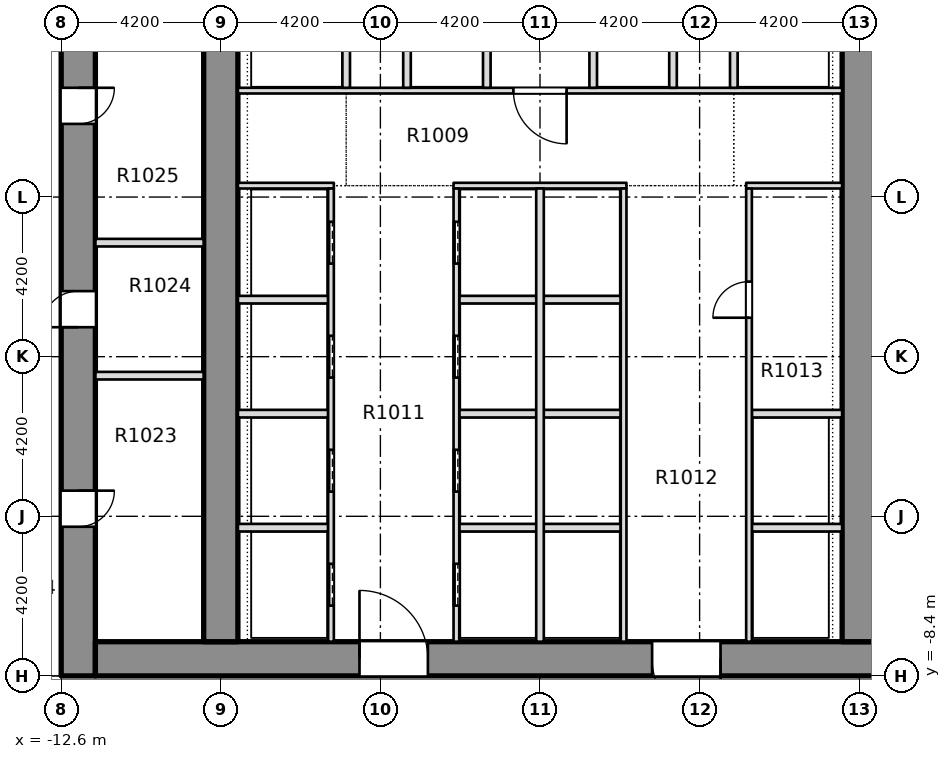
"""IFC4 building model, lengths in metres.
Left out: names, types, materials, properties, quantities, classifications, styles, units other than length and angle.
Written with IfcOpenShell. Run it as: python <this file> out.ifc"""

import sys

from ifc_helpers import new_model, si_unit, direction, frame, frame_2d, origin, place, context, subcontext, project, spatial, rectangle, extrude, element, fill, save


model = new_model("IFC4")
c1 = context("Model", 3, precision=1e-05, world=origin(), true_north=direction((0.0, 1.0)))
c2 = subcontext(c1, "Body", "Model", "MODEL_VIEW")
j1 = project(units=[si_unit("LENGTHUNIT", "METRE"), si_unit("PLANEANGLEUNIT", "RADIAN")], contexts=[c1])
p1 = place(None, origin())
s1 = spatial("IfcSite", under=j1, at=p1, CompositionType="ELEMENT")
p2 = place(p1, origin())
s2 = spatial("IfcBuilding", under=s1, at=p2, CompositionType="ELEMENT")
p3 = place(p2, frame((0.0, 0.0, 48.3)))
s3 = spatial("IfcBuildingStorey", under=s2, at=p3, CompositionType="ELEMENT", Elevation=48.3)
p4 = place(p3, frame((-12.15, -8.4, -0.32), z_axis=(0.0, 0.0, 1.0), x_axis=(0.0, 1.0, 0.0)))
e1 = element("IfcWall", 1, at=p4, inside=s3, PredefinedType="SHEAR", context=c2, shape_type="SweptSolid", body=[
    extrude(rectangle(XDim=30.15, YDim=0.9, at=frame_2d((15.075, 0.0))), origin(), (0.0, 0.0, 1.0), 3.45),
])
p5 = place(p4, frame((3.925, 0.0, 0.32)))
e2 = element("IfcOpeningElement", 2, at=p5, cuts=e1, PredefinedType="OPENING", context=c2, shape_type="SweptSolid", body=[
    extrude(rectangle(XDim=0.95, YDim=2.1, at=frame_2d((0.475, 1.05))), frame((0.0, 0.46, 0.0), z_axis=(0.0, -1.0, 0.0), x_axis=(1.0, 0.0, 0.0)), (0.0, 0.0, 1.0), 0.92),
])
p6 = place(p4, frame((9.175, 0.0, 0.32)))
e3 = element("IfcOpeningElement", 3, at=p6, cuts=e1, PredefinedType="OPENING", context=c2, shape_type="SweptSolid", body=[
    extrude(rectangle(XDim=0.95, YDim=2.1, at=frame_2d((0.475, 1.05))), frame((0.0, 0.46, 0.0), z_axis=(0.0, -1.0, 0.0), x_axis=(1.0, 0.0, 0.0)), (0.0, 0.0, 1.0), 0.92),
])
p7 = place(p4, frame((14.525, 0.0, 0.32)))
e4 = element("IfcOpeningElement", 4, at=p7, cuts=e1, PredefinedType="OPENING", context=c2, shape_type="SweptSolid", body=[
    extrude(rectangle(XDim=0.95, YDim=2.1, at=frame_2d((0.475, 1.05))), frame((0.0, 0.46, 0.0), z_axis=(0.0, -1.0, 0.0), x_axis=(1.0, 0.0, 0.0)), (0.0, 0.0, 1.0), 0.92),
])
p8 = place(p4, frame((22.225, 0.0, 0.32)))
e5 = element("IfcOpeningElement", 5, at=p8, cuts=e1, PredefinedType="OPENING", context=c2, shape_type="SweptSolid", body=[
    extrude(rectangle(XDim=0.95, YDim=2.1, at=frame_2d((0.475, 1.05))), frame((0.0, 0.46, 0.0), z_axis=(0.0, -1.0, 0.0), x_axis=(1.0, 0.0, 0.0)), (0.0, 0.0, 1.0), 0.92),
])
p9 = place(p4, frame((26.25, 0.0, 0.32)))
e6 = element("IfcOpeningElement", 6, at=p9, cuts=e1, PredefinedType="OPENING", context=c2, shape_type="SweptSolid", body=[
    extrude(rectangle(XDim=0.95, YDim=2.1, at=frame_2d((0.475, 1.05))), frame((0.0, 0.46, 0.0), z_axis=(0.0, -1.0, 0.0), x_axis=(1.0, 0.0, 0.0)), (0.0, 0.0, 1.0), 0.92),
])
p10 = place(p4, frame((19.3, 0.0, 0.32)))
e7 = element("IfcOpeningElement", 7, at=p10, cuts=e1, PredefinedType="OPENING", context=c2, shape_type="SweptSolid", body=[
    extrude(rectangle(XDim=1.2, YDim=2.1, at=frame_2d((0.6, 1.05))), frame((0.0, 0.46, 0.0), z_axis=(0.0, -1.0, 0.0), x_axis=(1.0, 0.0, 0.0)), (0.0, 0.0, 1.0), 0.92),
])
p11 = place(p3, frame((-11.7, -7.95, -0.32), z_axis=(0.0, 0.0, 1.0), x_axis=(1.0, 0.0, 0.0)))
e8 = element("IfcWall", 8, at=p11, inside=s3, PredefinedType="SHEAR", context=c2, shape_type="SweptSolid", body=[
    extrude(rectangle(XDim=23.4, YDim=0.9, at=frame_2d((11.7, 0.0))), origin(), (0.0, 0.0, 1.0), 3.45),
])
p12 = place(p11, frame((6.95, 0.0, 0.32)))
e9 = element("IfcOpeningElement", 9, at=p12, cuts=e8, PredefinedType="OPENING", context=c2, shape_type="SweptSolid", body=[
    extrude(rectangle(XDim=1.8, YDim=2.1, at=frame_2d((0.9, 1.05))), frame((0.0, 0.46, 0.0), z_axis=(0.0, -1.0, 0.0), x_axis=(1.0, 0.0, 0.0)), (0.0, 0.0, 1.0), 0.92),
])
p13 = place(p11, frame((14.65, 0.0, 0.32)))
e10 = element("IfcOpeningElement", 10, at=p13, cuts=e8, PredefinedType="OPENING", context=c2, shape_type="SweptSolid", body=[
    extrude(rectangle(XDim=1.8, YDim=2.1, at=frame_2d((0.9, 1.05))), frame((0.0, 0.46, 0.0), z_axis=(0.0, -1.0, 0.0), x_axis=(1.0, 0.0, 0.0)), (0.0, 0.0, 1.0), 0.92),
])
p14 = place(p3, frame((-8.4, -7.5, -0.32), z_axis=(0.0, 0.0, 1.0), x_axis=(0.0, 1.0, 0.0)))
e11 = element("IfcWall", 11, at=p14, inside=s3, PredefinedType="SHEAR", context=c2, shape_type="SweptSolid", body=[
    extrude(rectangle(XDim=28.35, YDim=0.9, at=frame_2d((14.175, 0.0))), origin(), (0.0, 0.0, 1.0), 3.45),
])
p15 = place(p14, frame((18.4, 0.0, 0.32)))
e12 = element("IfcOpeningElement", 12, at=p15, cuts=e11, PredefinedType="OPENING", context=c2, shape_type="SweptSolid", body=[
    extrude(rectangle(XDim=1.2, YDim=2.1, at=frame_2d((0.6, 1.05))), frame((0.0, 0.46, 0.0), z_axis=(0.0, -1.0, 0.0), x_axis=(1.0, 0.0, 0.0)), (0.0, 0.0, 1.0), 0.92),
])
p16 = place(p3, frame((8.4, -7.5, -0.32), z_axis=(0.0, 0.0, 1.0), x_axis=(0.0, 1.0, 0.0)))
e13 = element("IfcWall", 13, at=p16, inside=s3, PredefinedType="SHEAR", context=c2, shape_type="SweptSolid", body=[
    extrude(rectangle(XDim=28.35, YDim=0.9, at=frame_2d((14.175, 0.0))), origin(), (0.0, 0.0, 1.0), 3.45),
])
p17 = place(p16, frame((18.4, 0.0, 0.32)))
e14 = element("IfcOpeningElement", 14, at=p17, cuts=e13, PredefinedType="OPENING", context=c2, shape_type="SweptSolid", body=[
    extrude(rectangle(XDim=1.2, YDim=2.1, at=frame_2d((0.6, 1.05))), frame((0.0, 0.46, 0.0), z_axis=(0.0, -1.0, 0.0), x_axis=(1.0, 0.0, 0.0)), (0.0, 0.0, 1.0), 0.92),
])
p18 = place(p3, frame((-7.949, -4.5, 0.0), z_axis=(0.0, 0.0, 1.0), x_axis=(1.0, 0.0, 0.0)))
e15 = element("IfcWall", 15, at=p18, inside=s3, PredefinedType="PARTITIONING", context=c2, shape_type="SweptSolid", body=[
    extrude(rectangle(XDim=2.374, YDim=0.2, at=frame_2d((1.187, 0.0))), origin(), (0.0, 0.0, 1.0), 3.13),
])
p19 = place(p3, frame((-2.125, -4.5, 0.0), z_axis=(0.0, 0.0, 1.0), x_axis=(1.0, 0.0, 0.0)))
e16 = element("IfcWall", 16, at=p19, inside=s3, PredefinedType="PARTITIONING", context=c2, shape_type="SweptSolid", body=[
    extrude(rectangle(XDim=4.25, YDim=0.2, at=frame_2d((2.125, 0.0))), origin(), (0.0, 0.0, 1.0), 3.13),
])
for number, where, z_axis, x_axis in (
    (17, (5.575, -4.5, 0.0), (0.0, 0.0, 1.0), (1.0, 0.0, 0.0)),
    (18, (-7.949, -1.5, 0.0), (0.0, 0.0, 1.0), (1.0, 0.0, 0.0)),
):
    element("IfcWall", number, at=place(p3, frame(where, z_axis=z_axis, x_axis=x_axis)), inside=s3, PredefinedType="PARTITIONING", context=c2, shape_type="SweptSolid", body=[
        extrude(rectangle(XDim=2.374, YDim=0.2, at=frame_2d((1.187, 0.0))), origin(), (0.0, 0.0, 1.0), 3.13),
    ])
p20 = place(p3, frame((-2.125, -1.5, 0.0), z_axis=(0.0, 0.0, 1.0), x_axis=(1.0, 0.0, 0.0)))
e19 = element("IfcWall", 19, at=p20, inside=s3, PredefinedType="PARTITIONING", context=c2, shape_type="SweptSolid", body=[
    extrude(rectangle(XDim=4.25, YDim=0.2, at=frame_2d((2.125, 0.0))), origin(), (0.0, 0.0, 1.0), 3.13),
])
for number, where, z_axis, x_axis in (
    (20, (5.575, -1.5, 0.0), (0.0, 0.0, 1.0), (1.0, 0.0, 0.0)),
    (21, (-7.949, 1.5, 0.0), (0.0, 0.0, 1.0), (1.0, 0.0, 0.0)),
):
    element("IfcWall", number, at=place(p3, frame(where, z_axis=z_axis, x_axis=x_axis)), inside=s3, PredefinedType="PARTITIONING", context=c2, shape_type="SweptSolid", body=[
        extrude(rectangle(XDim=2.374, YDim=0.2, at=frame_2d((1.187, 0.0))), origin(), (0.0, 0.0, 1.0), 3.13),
    ])
p21 = place(p3, frame((-2.125, 1.5, 0.0), z_axis=(0.0, 0.0, 1.0), x_axis=(1.0, 0.0, 0.0)))
e22 = element("IfcWall", 22, at=p21, inside=s3, PredefinedType="PARTITIONING", context=c2, shape_type="SweptSolid", body=[
    extrude(rectangle(XDim=4.25, YDim=0.2, at=frame_2d((2.125, 0.0))), origin(), (0.0, 0.0, 1.0), 3.13),
])
p22 = place(p3, frame((-7.949, 4.5, 0.0), z_axis=(0.0, 0.0, 1.0), x_axis=(1.0, 0.0, 0.0)))
e23 = element("IfcWall", 23, at=p22, inside=s3, PredefinedType="PARTITIONING", context=c2, shape_type="SweptSolid", body=[
    extrude(rectangle(XDim=2.524, YDim=0.15, at=frame_2d((1.262, 0.0))), origin(), (0.0, 0.0, 1.0), 3.13),
])
p23 = place(p3, frame((-2.275, 4.5, 0.0), z_axis=(0.0, 0.0, 1.0), x_axis=(1.0, 0.0, 0.0)))
e24 = element("IfcWall", 24, at=p23, inside=s3, PredefinedType="PARTITIONING", context=c2, shape_type="SweptSolid", body=[
    extrude(rectangle(XDim=4.55, YDim=0.15, at=frame_2d((2.275, 0.0))), origin(), (0.0, 0.0, 1.0), 3.13),
])
p24 = place(p3, frame((5.425, 4.5, 0.0), z_axis=(0.0, 0.0, 1.0), x_axis=(1.0, 0.0, 0.0)))
e25 = element("IfcWall", 25, at=p24, inside=s3, PredefinedType="PARTITIONING", context=c2, shape_type="SweptSolid", body=[
    extrude(rectangle(XDim=2.524, YDim=0.15, at=frame_2d((1.262, 0.0))), origin(), (0.0, 0.0, 1.0), 3.13),
])
p25 = place(p3, frame((-7.949, 7.0, 0.0), z_axis=(0.0, 0.0, 1.0), x_axis=(1.0, 0.0, 0.0)))
e26 = element("IfcWall", 26, at=p25, inside=s3, PredefinedType="PARTITIONING", context=c2, shape_type="SweptSolid", body=[
    extrude(rectangle(XDim=15.898, YDim=0.15, at=frame_2d((7.949, 0.0))), origin(), (0.0, 0.0, 1.0), 3.13),
])
p26 = place(p25, frame((7.249, 0.0, 0.0)))
e27 = element("IfcOpeningElement", 27, at=p26, cuts=e26, PredefinedType="OPENING", context=c2, shape_type="SweptSolid", body=[
    extrude(rectangle(XDim=1.4, YDim=2.1, at=frame_2d((0.7, 1.05))), frame((0.0, 0.085, 0.0), z_axis=(0.0, -1.0, 0.0), x_axis=(1.0, 0.0, 0.0)), (0.0, 0.0, 1.0), 0.17),
])
p27 = place(p3, frame((-5.5, -7.499, 0.0), z_axis=(0.0, 0.0, 1.0), x_axis=(0.0, 1.0, 0.0)))
e28 = element("IfcWall", 28, at=p27, inside=s3, PredefinedType="PARTITIONING", context=c2, shape_type="SweptSolid", body=[
    extrude(rectangle(XDim=11.924, YDim=0.15, at=frame_2d((5.962, 0.0))), origin(), (0.0, 0.0, 1.0), 3.13),
])
p28 = place(p27, frame((0.949, 0.0, 0.0)))
e29 = element("IfcOpeningElement", 29, at=p28, cuts=e28, PredefinedType="OPENING", context=c2, shape_type="SweptSolid", body=[
    extrude(rectangle(XDim=1.1, YDim=2.1, at=frame_2d((0.55, 1.05))), frame((0.0, 0.085, 0.0), z_axis=(0.0, -1.0, 0.0), x_axis=(1.0, 0.0, 0.0)), (0.0, 0.0, 1.0), 0.17),
])
p29 = place(p27, frame((3.949, 0.0, 0.0)))
e30 = element("IfcOpeningElement", 30, at=p29, cuts=e28, PredefinedType="OPENING", context=c2, shape_type="SweptSolid", body=[
    extrude(rectangle(XDim=1.1, YDim=2.1, at=frame_2d((0.55, 1.05))), frame((0.0, 0.085, 0.0), z_axis=(0.0, -1.0, 0.0), x_axis=(1.0, 0.0, 0.0)), (0.0, 0.0, 1.0), 0.17),
])
p30 = place(p27, frame((6.949, 0.0, 0.0)))
e31 = element("IfcOpeningElement", 31, at=p30, cuts=e28, PredefinedType="OPENING", context=c2, shape_type="SweptSolid", body=[
    extrude(rectangle(XDim=1.1, YDim=2.1, at=frame_2d((0.55, 1.05))), frame((0.0, 0.085, 0.0), z_axis=(0.0, -1.0, 0.0), x_axis=(1.0, 0.0, 0.0)), (0.0, 0.0, 1.0), 0.17),
])
p31 = place(p27, frame((9.949, 0.0, 0.0)))
e32 = element("IfcOpeningElement", 32, at=p31, cuts=e28, PredefinedType="OPENING", context=c2, shape_type="SweptSolid", body=[
    extrude(rectangle(XDim=1.1, YDim=2.1, at=frame_2d((0.55, 1.05))), frame((0.0, 0.085, 0.0), z_axis=(0.0, -1.0, 0.0), x_axis=(1.0, 0.0, 0.0)), (0.0, 0.0, 1.0), 0.17),
])
p32 = place(p3, frame((-5.1, 7.075, 0.0), z_axis=(0.0, 0.0, 1.0), x_axis=(0.0, 1.0, 0.0)))
e33 = element("IfcWall", 33, at=p32, inside=s3, PredefinedType="PARTITIONING", context=c2, shape_type="SweptSolid", body=[
    extrude(rectangle(XDim=2.725, YDim=0.2, at=frame_2d((1.363, 0.0))), origin(), (0.0, 0.0, 1.0), 3.13),
])
p33 = place(p3, frame((-3.5, 7.075, 0.0), z_axis=(0.0, 0.0, 1.0), x_axis=(0.0, 1.0, 0.0)))
e34 = element("IfcWall", 34, at=p33, inside=s3, PredefinedType="PARTITIONING", context=c2, shape_type="SweptSolid", body=[
    extrude(rectangle(XDim=2.85, YDim=0.2, at=frame_2d((1.425, 0.0))), origin(), (0.0, 0.0, 1.0), 3.13),
])
p34 = place(p3, frame((-2.2, -7.499, 0.0), z_axis=(0.0, 0.0, 1.0), x_axis=(0.0, 1.0, 0.0)))
e35 = element("IfcWall", 35, at=p34, inside=s3, PredefinedType="PARTITIONING", context=c2, shape_type="SweptSolid", body=[
    extrude(rectangle(XDim=11.924, YDim=0.15, at=frame_2d((5.962, 0.0))), origin(), (0.0, 0.0, 1.0), 3.13),
])
p35 = place(p34, frame((0.949, 0.0, 0.0)))
e36 = element("IfcOpeningElement", 36, at=p35, cuts=e35, PredefinedType="OPENING", context=c2, shape_type="SweptSolid", body=[
    extrude(rectangle(XDim=1.1, YDim=2.1, at=frame_2d((0.55, 1.05))), frame((0.0, 0.085, 0.0), z_axis=(0.0, -1.0, 0.0), x_axis=(1.0, 0.0, 0.0)), (0.0, 0.0, 1.0), 0.17),
])
p36 = place(p34, frame((3.949, 0.0, 0.0)))
e37 = element("IfcOpeningElement", 37, at=p36, cuts=e35, PredefinedType="OPENING", context=c2, shape_type="SweptSolid", body=[
    extrude(rectangle(XDim=1.1, YDim=2.1, at=frame_2d((0.55, 1.05))), frame((0.0, 0.085, 0.0), z_axis=(0.0, -1.0, 0.0), x_axis=(1.0, 0.0, 0.0)), (0.0, 0.0, 1.0), 0.17),
])
p37 = place(p34, frame((6.949, 0.0, 0.0)))
e38 = element("IfcOpeningElement", 38, at=p37, cuts=e35, PredefinedType="OPENING", context=c2, shape_type="SweptSolid", body=[
    extrude(rectangle(XDim=1.1, YDim=2.1, at=frame_2d((0.55, 1.05))), frame((0.0, 0.085, 0.0), z_axis=(0.0, -1.0, 0.0), x_axis=(1.0, 0.0, 0.0)), (0.0, 0.0, 1.0), 0.17),
])
p38 = place(p34, frame((9.949, 0.0, 0.0)))
e39 = element("IfcOpeningElement", 39, at=p38, cuts=e35, PredefinedType="OPENING", context=c2, shape_type="SweptSolid", body=[
    extrude(rectangle(XDim=1.1, YDim=2.1, at=frame_2d((0.55, 1.05))), frame((0.0, 0.085, 0.0), z_axis=(0.0, -1.0, 0.0), x_axis=(1.0, 0.0, 0.0)), (0.0, 0.0, 1.0), 0.17),
])
p39 = place(p3, frame((-1.4, 7.075, 0.0), z_axis=(0.0, 0.0, 1.0), x_axis=(0.0, 1.0, 0.0)))
e40 = element("IfcWall", 40, at=p39, inside=s3, PredefinedType="PARTITIONING", context=c2, shape_type="SweptSolid", body=[
    extrude(rectangle(XDim=2.85, YDim=0.2, at=frame_2d((1.425, 0.0))), origin(), (0.0, 0.0, 1.0), 3.13),
])
p40 = place(p3, frame((0.0, -7.499, 0.0), z_axis=(0.0, 0.0, 1.0), x_axis=(0.0, 1.0, 0.0)))
e41 = element("IfcWall", 41, at=p40, inside=s3, PredefinedType="PARTITIONING", context=c2, shape_type="SweptSolid", body=[
    extrude(rectangle(XDim=11.924, YDim=0.2, at=frame_2d((5.962, 0.0))), origin(), (0.0, 0.0, 1.0), 3.13),
])
p41 = place(p3, frame((1.4, 7.075, 0.0), z_axis=(0.0, 0.0, 1.0), x_axis=(0.0, 1.0, 0.0)))
e42 = element("IfcWall", 42, at=p41, inside=s3, PredefinedType="PARTITIONING", context=c2, shape_type="SweptSolid", body=[
    extrude(rectangle(XDim=2.85, YDim=0.2, at=frame_2d((1.425, 0.0))), origin(), (0.0, 0.0, 1.0), 3.13),
])
p42 = place(p3, frame((2.2, -7.499, 0.0), z_axis=(0.0, 0.0, 1.0), x_axis=(0.0, 1.0, 0.0)))
e43 = element("IfcWall", 43, at=p42, inside=s3, PredefinedType="PARTITIONING", context=c2, shape_type="SweptSolid", body=[
    extrude(rectangle(XDim=11.924, YDim=0.15, at=frame_2d((5.962, 0.0))), origin(), (0.0, 0.0, 1.0), 3.13),
])
p43 = place(p3, frame((3.5, 7.075, 0.0), z_axis=(0.0, 0.0, 1.0), x_axis=(0.0, 1.0, 0.0)))
e44 = element("IfcWall", 44, at=p43, inside=s3, PredefinedType="PARTITIONING", context=c2, shape_type="SweptSolid", body=[
    extrude(rectangle(XDim=2.85, YDim=0.2, at=frame_2d((1.425, 0.0))), origin(), (0.0, 0.0, 1.0), 3.13),
])
p44 = place(p3, frame((5.1, 7.075, 0.0), z_axis=(0.0, 0.0, 1.0), x_axis=(0.0, 1.0, 0.0)))
e45 = element("IfcWall", 45, at=p44, inside=s3, PredefinedType="PARTITIONING", context=c2, shape_type="SweptSolid", body=[
    extrude(rectangle(XDim=2.725, YDim=0.2, at=frame_2d((1.363, 0.0))), origin(), (0.0, 0.0, 1.0), 3.13),
])
p45 = place(p3, frame((5.5, -7.499, 0.0), z_axis=(0.0, 0.0, 1.0), x_axis=(0.0, 1.0, 0.0)))
e46 = element("IfcWall", 46, at=p45, inside=s3, PredefinedType="PARTITIONING", context=c2, shape_type="SweptSolid", body=[
    extrude(rectangle(XDim=11.924, YDim=0.15, at=frame_2d((5.962, 0.0))), origin(), (0.0, 0.0, 1.0), 3.13),
])
p46 = place(p45, frame((8.524, 0.0, 0.0)))
e47 = element("IfcOpeningElement", 47, at=p46, cuts=e46, PredefinedType="OPENING", context=c2, shape_type="SweptSolid", body=[
    extrude(rectangle(XDim=0.95, YDim=2.1, at=frame_2d((0.475, 1.05))), frame((0.0, 0.085, 0.0), z_axis=(0.0, -1.0, 0.0), x_axis=(1.0, 0.0, 0.0)), (0.0, 0.0, 1.0), 0.17),
])
for number, where, z_axis, x_axis in (
    (48, (-11.699, -0.5, 0.0), (0.0, 0.0, 1.0), (1.0, 0.0, 0.0)),
    (49, (-11.699, 3.0, 0.0), (0.0, 0.0, 1.0), (1.0, 0.0, 0.0)),
):
    element("IfcWall", number, at=place(p3, frame(where, z_axis=z_axis, x_axis=x_axis)), inside=s3, PredefinedType="PARTITIONING", context=c2, shape_type="SweptSolid", body=[
        extrude(rectangle(XDim=2.848, YDim=0.2, at=frame_2d((1.424, 0.0))), origin(), (0.0, 0.0, 1.0), 3.13),
    ])
p47 = place(p28, origin())
e50 = element("IfcDoor", 50, at=p47, inside=s3, OperationType="SLIDING_TO_RIGHT", PredefinedType="DOOR", context=c2, shape_type="SweptSolid", body=[
    extrude(rectangle(XDim=1.1, YDim=2.1, at=frame_2d((0.55, 1.05))), frame((0.0, 0.025, 0.0), z_axis=(0.0, -1.0, 0.0), x_axis=(1.0, 0.0, 0.0)), (0.0, 0.0, 1.0), 0.05),
])
fill(e29, e50)
p48 = place(p29, origin())
e51 = element("IfcDoor", 51, at=p48, inside=s3, OperationType="SLIDING_TO_RIGHT", PredefinedType="DOOR", context=c2, shape_type="SweptSolid", body=[
    extrude(rectangle(XDim=1.1, YDim=2.1, at=frame_2d((0.55, 1.05))), frame((0.0, 0.025, 0.0), z_axis=(0.0, -1.0, 0.0), x_axis=(1.0, 0.0, 0.0)), (0.0, 0.0, 1.0), 0.05),
])
fill(e30, e51)
p49 = place(p30, origin())
e52 = element("IfcDoor", 52, at=p49, inside=s3, OperationType="SLIDING_TO_RIGHT", PredefinedType="DOOR", context=c2, shape_type="SweptSolid", body=[
    extrude(rectangle(XDim=1.1, YDim=2.1, at=frame_2d((0.55, 1.05))), frame((0.0, 0.025, 0.0), z_axis=(0.0, -1.0, 0.0), x_axis=(1.0, 0.0, 0.0)), (0.0, 0.0, 1.0), 0.05),
])
fill(e31, e52)
p50 = place(p31, origin())
e53 = element("IfcDoor", 53, at=p50, inside=s3, OperationType="SLIDING_TO_RIGHT", PredefinedType="DOOR", context=c2, shape_type="SweptSolid", body=[
    extrude(rectangle(XDim=1.1, YDim=2.1, at=frame_2d((0.55, 1.05))), frame((0.0, 0.025, 0.0), z_axis=(0.0, -1.0, 0.0), x_axis=(1.0, 0.0, 0.0)), (0.0, 0.0, 1.0), 0.05),
])
fill(e32, e53)
p51 = place(p35, origin())
e54 = element("IfcDoor", 54, at=p51, inside=s3, OperationType="SLIDING_TO_RIGHT", PredefinedType="DOOR", context=c2, shape_type="SweptSolid", body=[
    extrude(rectangle(XDim=1.1, YDim=2.1, at=frame_2d((0.55, 1.05))), frame((0.0, 0.025, 0.0), z_axis=(0.0, -1.0, 0.0), x_axis=(1.0, 0.0, 0.0)), (0.0, 0.0, 1.0), 0.05),
])
fill(e36, e54)
p52 = place(p36, origin())
e55 = element("IfcDoor", 55, at=p52, inside=s3, OperationType="SLIDING_TO_RIGHT", PredefinedType="DOOR", context=c2, shape_type="SweptSolid", body=[
    extrude(rectangle(XDim=1.1, YDim=2.1, at=frame_2d((0.55, 1.05))), frame((0.0, 0.025, 0.0), z_axis=(0.0, -1.0, 0.0), x_axis=(1.0, 0.0, 0.0)), (0.0, 0.0, 1.0), 0.05),
])
fill(e37, e55)
p53 = place(p37, origin())
e56 = element("IfcDoor", 56, at=p53, inside=s3, OperationType="SLIDING_TO_RIGHT", PredefinedType="DOOR", context=c2, shape_type="SweptSolid", body=[
    extrude(rectangle(XDim=1.1, YDim=2.1, at=frame_2d((0.55, 1.05))), frame((0.0, 0.025, 0.0), z_axis=(0.0, -1.0, 0.0), x_axis=(1.0, 0.0, 0.0)), (0.0, 0.0, 1.0), 0.05),
])
fill(e38, e56)
p54 = place(p38, origin())
e57 = element("IfcDoor", 57, at=p54, inside=s3, OperationType="SLIDING_TO_RIGHT", PredefinedType="DOOR", context=c2, shape_type="SweptSolid", body=[
    extrude(rectangle(XDim=1.1, YDim=2.1, at=frame_2d((0.55, 1.05))), frame((0.0, 0.025, 0.0), z_axis=(0.0, -1.0, 0.0), x_axis=(1.0, 0.0, 0.0)), (0.0, 0.0, 1.0), 0.05),
])
fill(e39, e57)
p55 = place(p46, origin())
e58 = element("IfcDoor", 58, at=p55, inside=s3, OperationType="SINGLE_SWING_LEFT", PredefinedType="DOOR", context=c2, shape_type="SweptSolid", body=[
    extrude(rectangle(XDim=0.95, YDim=2.1, at=frame_2d((0.475, 1.05))), frame((0.0, 0.025, 0.0), z_axis=(0.0, -1.0, 0.0), x_axis=(1.0, 0.0, 0.0)), (0.0, 0.0, 1.0), 0.05),
])
fill(e47, e58)
p56 = place(p26, origin())
e59 = element("IfcDoor", 59, at=p56, inside=s3, OperationType="SINGLE_SWING_RIGHT", PredefinedType="DOOR", context=c2, shape_type="SweptSolid", body=[
    extrude(rectangle(XDim=1.4, YDim=2.1, at=frame_2d((0.7, 1.05))), frame((0.0, 0.025, 0.0), z_axis=(0.0, -1.0, 0.0), x_axis=(1.0, 0.0, 0.0)), (0.0, 0.0, 1.0), 0.05),
])
fill(e27, e59)
p57 = place(p12, origin())
e60 = element("IfcDoor", 60, at=p57, inside=s3, OperationType="SINGLE_SWING_LEFT", PredefinedType="DOOR", context=c2, shape_type="SweptSolid", body=[
    extrude(rectangle(XDim=1.8, YDim=2.1, at=frame_2d((0.9, 1.05))), frame((0.0, 0.025, 0.0), z_axis=(0.0, -1.0, 0.0), x_axis=(1.0, 0.0, 0.0)), (0.0, 0.0, 1.0), 0.05),
])
fill(e9, e60)
p58 = place(p13, origin())
e61 = element("IfcDoor", 61, at=p58, inside=s3, OperationType="SINGLE_SWING_LEFT", PredefinedType="DOOR", context=c2, shape_type="SweptSolid", body=[
    extrude(rectangle(XDim=1.8, YDim=2.1, at=frame_2d((0.9, 1.05))), frame((0.0, 0.025, 0.0), z_axis=(0.0, -1.0, 0.0), x_axis=(1.0, 0.0, 0.0)), (0.0, 0.0, 1.0), 0.05),
])
fill(e10, e61)
p59 = place(p5, origin())
e62 = element("IfcDoor", 62, at=p59, inside=s3, OperationType="SINGLE_SWING_LEFT", PredefinedType="DOOR", context=c2, shape_type="SweptSolid", body=[
    extrude(rectangle(XDim=0.95, YDim=2.1, at=frame_2d((0.475, 1.05))), frame((0.0, 0.025, 0.0), z_axis=(0.0, -1.0, 0.0), x_axis=(1.0, 0.0, 0.0)), (0.0, 0.0, 1.0), 0.05),
])
fill(e2, e62)
p60 = place(p6, origin())
e63 = element("IfcDoor", 63, at=p60, inside=s3, OperationType="SINGLE_SWING_LEFT", PredefinedType="DOOR", context=c2, shape_type="SweptSolid", body=[
    extrude(rectangle(XDim=0.95, YDim=2.1, at=frame_2d((0.475, 1.05))), frame((0.0, 0.025, 0.0), z_axis=(0.0, -1.0, 0.0), x_axis=(1.0, 0.0, 0.0)), (0.0, 0.0, 1.0), 0.05),
])
fill(e3, e63)
p61 = place(p7, origin())
e64 = element("IfcDoor", 64, at=p61, inside=s3, OperationType="SINGLE_SWING_LEFT", PredefinedType="DOOR", context=c2, shape_type="SweptSolid", body=[
    extrude(rectangle(XDim=0.95, YDim=2.1, at=frame_2d((0.475, 1.05))), frame((0.0, 0.025, 0.0), z_axis=(0.0, -1.0, 0.0), x_axis=(1.0, 0.0, 0.0)), (0.0, 0.0, 1.0), 0.05),
])
fill(e4, e64)
save(model, sys.argv[1])
